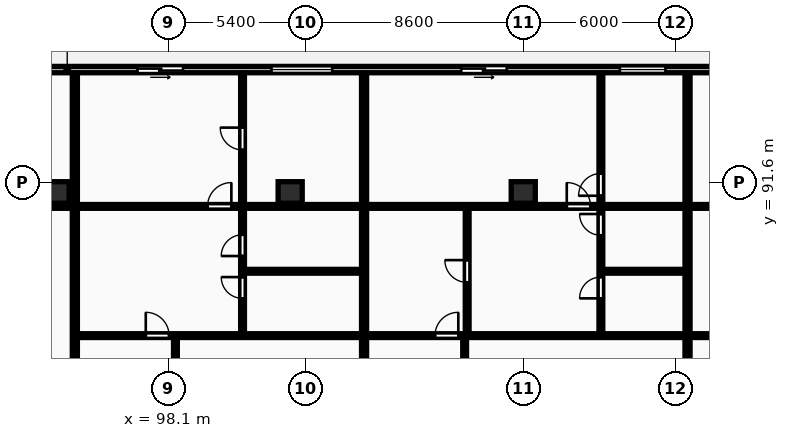
"""IFC4 building model, lengths in metres.
Left out: names, types, materials, properties, quantities, classifications, styles, units other than length and angle.
Written with IfcOpenShell. Run it as: python <this file> out.ifc"""

import sys

from ifc_helpers import new_model, si_unit, direction, frame, frame_2d, origin, origin_2d, place, context, subcontext, project, spatial, rectangle, extrude, element, fill, save


model = new_model("IFC4")
c1 = context("Model", 3, precision=1e-05, world=origin(), true_north=direction((0.0, 1.0)))
c2 = subcontext(c1, "Body", "Model", "MODEL_VIEW")
j1 = project(units=[si_unit("LENGTHUNIT", "METRE"), si_unit("PLANEANGLEUNIT", "RADIAN")], contexts=[c1])
p1 = place(None, origin())
s1 = spatial("IfcSite", under=j1, at=p1, CompositionType="ELEMENT")
p2 = place(p1, origin())
s2 = spatial("IfcBuilding", under=s1, at=p2, CompositionType="ELEMENT")
p3 = place(p2, frame((0.0, 0.0, 113.3)))
s3 = spatial("IfcBuildingStorey", under=s2, at=p3, CompositionType="ELEMENT", Elevation=113.3)
for number, where, z_axis, x_axis in (
    (1, (93.7, 91.2, 0.0), (0.0, 0.0, 1.0), (1.0, 0.0, 0.0)),
    (2, (102.9, 91.2, 0.0), (0.0, 0.0, 1.0), (1.0, 0.0, 0.0)),
    (3, (112.1, 91.2, 0.0), (0.0, 0.0, 1.0), (1.0, 0.0, 0.0)),
):
    element("IfcColumn", number, at=place(p3, frame(where, z_axis=z_axis, x_axis=x_axis)), inside=s3, PredefinedType="COLUMN", context=c2, shape_type="SweptSolid", body=[
        extrude(rectangle(XDim=0.95, YDim=0.85, at=origin_2d()), origin(), (0.0, 0.0, 1.0), 3.25),
    ])
p4 = place(p3, frame((130.6, 96.05, 0.0), z_axis=(0.0, 0.0, 1.0), x_axis=(-1.0, 0.0, 0.0)))
e4 = element("IfcWall", 4, at=p4, inside=s3, PredefinedType="STANDARD", context=c2, shape_type="SweptSolid", body=[
    extrude(rectangle(XDim=73.0, YDim=0.25, at=frame_2d((36.5, 0.0))), origin(), (0.0, 0.0, 1.0), 2.97),
])
p5 = place(p4, frame((68.319, 0.0, 0.0)))
e5 = element("IfcOpeningElement", 5, at=p5, cuts=e4, PredefinedType="OPENING", context=c2, shape_type="SweptSolid", body=[
    extrude(rectangle(XDim=1.8, YDim=2.2, at=frame_2d((0.9, 1.1))), frame((0.0, 0.135, 0.0), z_axis=(0.0, -1.0, 0.0), x_axis=(1.0, 0.0, 0.0)), (0.0, 0.0, 1.0), 0.27),
])
p6 = place(p4, frame((59.277, 0.0, 0.85)))
e6 = element("IfcOpeningElement", 6, at=p6, cuts=e4, PredefinedType="OPENING", context=c2, shape_type="SweptSolid", body=[
    extrude(rectangle(XDim=2.4, YDim=1.9, at=frame_2d((1.2, 0.95))), frame((0.0, 0.135, 0.0), z_axis=(0.0, -1.0, 0.0), x_axis=(1.0, 0.0, 0.0)), (0.0, 0.0, 1.0), 0.27),
])
p7 = place(p4, frame((50.199, 0.0, 0.0)))
e7 = element("IfcOpeningElement", 7, at=p7, cuts=e4, PredefinedType="OPENING", context=c2, shape_type="SweptSolid", body=[
    extrude(rectangle(XDim=1.8, YDim=2.2, at=frame_2d((0.9, 1.1))), frame((0.0, 0.135, 0.0), z_axis=(0.0, -1.0, 0.0), x_axis=(1.0, 0.0, 0.0)), (0.0, 0.0, 1.0), 0.27),
])
p8 = place(p4, frame((40.481, 0.0, 0.85)))
e8 = element("IfcOpeningElement", 8, at=p8, cuts=e4, PredefinedType="OPENING", context=c2, shape_type="SweptSolid", body=[
    extrude(rectangle(XDim=2.4, YDim=1.9, at=frame_2d((1.2, 0.95))), frame((0.0, 0.135, 0.0), z_axis=(0.0, -1.0, 0.0), x_axis=(1.0, 0.0, 0.0)), (0.0, 0.0, 1.0), 0.27),
])
p9 = place(p4, frame((31.93, 0.0, 0.0)))
e9 = element("IfcOpeningElement", 9, at=p9, cuts=e4, PredefinedType="OPENING", context=c2, shape_type="SweptSolid", body=[
    extrude(rectangle(XDim=1.8, YDim=2.2, at=frame_2d((0.9, 1.1))), frame((0.0, 0.135, 0.0), z_axis=(0.0, -1.0, 0.0), x_axis=(1.0, 0.0, 0.0)), (0.0, 0.0, 1.0), 0.27),
])
p10 = place(p4, frame((26.042, 0.0, 0.85)))
e10 = element("IfcOpeningElement", 10, at=p10, cuts=e4, PredefinedType="OPENING", context=c2, shape_type="SweptSolid", body=[
    extrude(rectangle(XDim=2.4, YDim=1.9, at=frame_2d((1.2, 0.95))), frame((0.0, 0.135, 0.0), z_axis=(0.0, -1.0, 0.0), x_axis=(1.0, 0.0, 0.0)), (0.0, 0.0, 1.0), 0.27),
])
p11 = place(p4, frame((19.15, 0.0, 0.0)))
e11 = element("IfcOpeningElement", 11, at=p11, cuts=e4, PredefinedType="OPENING", context=c2, shape_type="SweptSolid", body=[
    extrude(rectangle(XDim=1.8, YDim=2.2, at=frame_2d((0.9, 1.1))), frame((0.0, 0.135, 0.0), z_axis=(0.0, -1.0, 0.0), x_axis=(1.0, 0.0, 0.0)), (0.0, 0.0, 1.0), 0.27),
])
p12 = place(p4, frame((12.886, 0.0, 0.85)))
e12 = element("IfcOpeningElement", 12, at=p12, cuts=e4, PredefinedType="OPENING", context=c2, shape_type="SweptSolid", body=[
    extrude(rectangle(XDim=1.8, YDim=1.8, at=frame_2d((0.9, 0.9))), frame((0.0, 0.135, 0.0), z_axis=(0.0, -1.0, 0.0), x_axis=(1.0, 0.0, 0.0)), (0.0, 0.0, 1.0), 0.27),
])
p13 = place(p4, frame((7.088, 0.0, 0.0)))
e13 = element("IfcOpeningElement", 13, at=p13, cuts=e4, PredefinedType="OPENING", context=c2, shape_type="SweptSolid", body=[
    extrude(rectangle(XDim=1.8, YDim=2.2, at=frame_2d((0.9, 1.1))), frame((0.0, 0.135, 0.0), z_axis=(0.0, -1.0, 0.0), x_axis=(1.0, 0.0, 0.0)), (0.0, 0.0, 1.0), 0.27),
])
p14 = place(p4, frame((0.9, 0.0, 0.85)))
e14 = element("IfcOpeningElement", 14, at=p14, cuts=e4, PredefinedType="OPENING", context=c2, shape_type="SweptSolid", body=[
    extrude(rectangle(XDim=2.4, YDim=1.9, at=frame_2d((1.2, 0.95))), frame((0.0, 0.135, 0.0), z_axis=(0.0, -1.0, 0.0), x_axis=(1.0, 0.0, 0.0)), (0.0, 0.0, 1.0), 0.27),
])
p15 = place(p3, frame((94.401, 69.83, 0.0), z_axis=(0.0, 0.0, 1.0), x_axis=(0.0, 1.0, 0.0)))
e15 = element("IfcWall", 15, at=p15, inside=s3, PredefinedType="PARTITIONING", context=c2, shape_type="SweptSolid", body=[
    extrude(rectangle(XDim=26.07, YDim=0.2, at=frame_2d((13.035, 0.0))), origin(), (0.0, 0.0, 1.0), 2.97),
])
p16 = place(p3, frame((75.405, 90.65, 0.0), z_axis=(0.0, 0.0, 1.0), x_axis=(1.0, 0.0, 0.0)))
e16 = element("IfcWall", 16, at=p16, inside=s3, PredefinedType="PARTITIONING", context=c2, shape_type="SweptSolid", body=[
    extrude(rectangle(XDim=18.916, YDim=0.15, at=frame_2d((9.458, 0.0))), origin(), (0.0, 0.0, 1.0), 2.97),
])
p17 = place(p16, frame((6.426, 0.0, 0.0)))
e17 = element("IfcOpeningElement", 17, at=p17, cuts=e16, PredefinedType="OPENING", context=c2, shape_type="SweptSolid", body=[
    extrude(rectangle(XDim=0.94, YDim=2.1, at=frame_2d((0.47, 1.05))), frame((0.0, 0.085, 0.0), z_axis=(0.0, -1.0, 0.0), x_axis=(1.0, 0.0, 0.0)), (0.0, 0.0, 1.0), 0.17),
])
p18 = place(p16, frame((10.856, 0.0, 0.0)))
e18 = element("IfcOpeningElement", 18, at=p18, cuts=e16, PredefinedType="OPENING", context=c2, shape_type="SweptSolid", body=[
    extrude(rectangle(XDim=0.94, YDim=2.1, at=frame_2d((0.47, 1.05))), frame((0.0, 0.085, 0.0), z_axis=(0.0, -1.0, 0.0), x_axis=(1.0, 0.0, 0.0)), (0.0, 0.0, 1.0), 0.17),
])
p19 = place(p3, frame((105.817, 69.83, 0.0), z_axis=(0.0, 0.0, 1.0), x_axis=(0.0, 1.0, 0.0)))
e19 = element("IfcWall", 19, at=p19, inside=s3, PredefinedType="PARTITIONING", context=c2, shape_type="SweptSolid", body=[
    extrude(rectangle(XDim=26.07, YDim=0.2, at=frame_2d((13.035, 0.0))), origin(), (0.0, 0.0, 1.0), 2.97),
])
p20 = place(p3, frame((98.371, 69.81, 0.0), z_axis=(0.0, 0.0, 1.0), x_axis=(0.0, 1.0, 0.0)))
e20 = element("IfcWall", 20, at=p20, inside=s3, PredefinedType="PARTITIONING", context=c2, shape_type="SweptSolid", body=[
    extrude(rectangle(XDim=15.7, YDim=0.15, at=frame_2d((7.85, 0.0))), origin(), (0.0, 0.0, 1.0), 2.97),
])
p21 = place(p20, frame((6.54, 0.0, 0.0)))
e21 = element("IfcOpeningElement", 21, at=p21, cuts=e20, PredefinedType="OPENING", context=c2, shape_type="SweptSolid", body=[
    extrude(rectangle(XDim=0.88, YDim=2.06, at=frame_2d((0.44, 1.03))), frame((0.0, 0.085, 0.0), z_axis=(0.0, -1.0, 0.0), x_axis=(1.0, 0.0, 0.0)), (0.0, 0.0, 1.0), 0.17),
])
p22 = place(p3, frame((101.08, 88.09, 0.0), z_axis=(0.0, 0.0, 1.0), x_axis=(1.0, 0.0, 0.0)))
e22 = element("IfcWall", 22, at=p22, inside=s3, PredefinedType="PARTITIONING", context=c2, shape_type="SweptSolid", body=[
    extrude(rectangle(XDim=4.656, YDim=0.15, at=frame_2d((2.328, 0.0))), origin(), (0.0, 0.0, 1.0), 2.97),
])
p23 = place(p3, frame((101.02, 85.59, 0.0), z_axis=(0.0, 0.0, 1.0), x_axis=(0.0, 1.0, 0.0)))
e23 = element("IfcWall", 23, at=p23, inside=s3, PredefinedType="PARTITIONING", context=c2, shape_type="SweptSolid", body=[
    extrude(rectangle(XDim=10.31, YDim=0.15, at=frame_2d((5.155, 0.0))), origin(), (0.0, 0.0, 1.0), 2.97),
])
p24 = place(p23, frame((1.43, 0.0, 0.0)))
e24 = element("IfcOpeningElement", 24, at=p24, cuts=e23, PredefinedType="OPENING", context=c2, shape_type="SweptSolid", body=[
    extrude(rectangle(XDim=0.84, YDim=2.04, at=frame_2d((0.42, 1.02))), frame((0.0, 0.085, 0.0), z_axis=(0.0, -1.0, 0.0), x_axis=(1.0, 0.0, 0.0)), (0.0, 0.0, 1.0), 0.17),
])
p25 = place(p23, frame((3.102, 0.0, 0.0)))
e25 = element("IfcOpeningElement", 25, at=p25, cuts=e23, PredefinedType="OPENING", context=c2, shape_type="SweptSolid", body=[
    extrude(rectangle(XDim=0.84, YDim=2.04, at=frame_2d((0.42, 1.02))), frame((0.0, 0.085, 0.0), z_axis=(0.0, -1.0, 0.0), x_axis=(1.0, 0.0, 0.0)), (0.0, 0.0, 1.0), 0.17),
])
p26 = place(p23, frame((7.29, 0.0, 0.0)))
e26 = element("IfcOpeningElement", 26, at=p26, cuts=e23, PredefinedType="OPENING", context=c2, shape_type="SweptSolid", body=[
    extrude(rectangle(XDim=0.88, YDim=2.06, at=frame_2d((0.44, 1.03))), frame((0.0, 0.085, 0.0), z_axis=(0.0, -1.0, 0.0), x_axis=(1.0, 0.0, 0.0)), (0.0, 0.0, 1.0), 0.17),
])
p27 = place(p3, frame((94.481, 85.55, 0.0), z_axis=(0.0, 0.0, 1.0), x_axis=(1.0, 0.0, 0.0)))
e27 = element("IfcWall", 27, at=p27, inside=s3, PredefinedType="PARTITIONING", context=c2, shape_type="SweptSolid", body=[
    extrude(rectangle(XDim=11.256, YDim=0.15, at=frame_2d((5.628, 0.0))), origin(), (0.0, 0.0, 1.0), 2.97),
])
p28 = place(p27, frame((2.72, 0.0, 0.0)))
e28 = element("IfcOpeningElement", 28, at=p28, cuts=e27, PredefinedType="OPENING", context=c2, shape_type="SweptSolid", body=[
    extrude(rectangle(XDim=0.92, YDim=2.08, at=frame_2d((0.46, 1.04))), frame((0.0, 0.085, 0.0), z_axis=(0.0, -1.0, 0.0), x_axis=(1.0, 0.0, 0.0)), (0.0, 0.0, 1.0), 0.17),
])
p29 = place(p3, frame((94.481, 90.65, 0.0), z_axis=(0.0, 0.0, 1.0), x_axis=(1.0, 0.0, 0.0)))
e29 = element("IfcWall", 29, at=p29, inside=s3, PredefinedType="PARTITIONING", context=c2, shape_type="SweptSolid", body=[
    extrude(rectangle(XDim=11.256, YDim=0.15, at=frame_2d((5.628, 0.0))), origin(), (0.0, 0.0, 1.0), 2.97),
])
p30 = place(p29, frame((5.158, 0.0, 0.0)))
e30 = element("IfcOpeningElement", 30, at=p30, cuts=e29, PredefinedType="OPENING", context=c2, shape_type="SweptSolid", body=[
    extrude(rectangle(XDim=0.94, YDim=2.1, at=frame_2d((0.47, 1.05))), frame((0.0, 0.085, 0.0), z_axis=(0.0, -1.0, 0.0), x_axis=(1.0, 0.0, 0.0)), (0.0, 0.0, 1.0), 0.17),
])
p31 = place(p3, frame((118.584, 69.83, 0.0), z_axis=(0.0, 0.0, 1.0), x_axis=(0.0, 1.0, 0.0)))
e31 = element("IfcWall", 31, at=p31, inside=s3, PredefinedType="PARTITIONING", context=c2, shape_type="SweptSolid", body=[
    extrude(rectangle(XDim=26.07, YDim=0.2, at=frame_2d((13.035, 0.0))), origin(), (0.0, 0.0, 1.0), 2.97),
])
p32 = place(p3, frame((109.787, 69.81, 0.0), z_axis=(0.0, 0.0, 1.0), x_axis=(0.0, 1.0, 0.0)))
e32 = element("IfcWall", 32, at=p32, inside=s3, PredefinedType="PARTITIONING", context=c2, shape_type="SweptSolid", body=[
    extrude(rectangle(XDim=15.7, YDim=0.15, at=frame_2d((7.85, 0.0))), origin(), (0.0, 0.0, 1.0), 2.97),
])
p33 = place(p32, frame((6.72, 0.0, 0.0)))
e33 = element("IfcOpeningElement", 33, at=p33, cuts=e32, PredefinedType="OPENING", context=c2, shape_type="SweptSolid", body=[
    extrude(rectangle(XDim=0.88, YDim=2.06, at=frame_2d((0.44, 1.03))), frame((0.0, 0.085, 0.0), z_axis=(0.0, -1.0, 0.0), x_axis=(1.0, 0.0, 0.0)), (0.0, 0.0, 1.0), 0.17),
])
p34 = place(p3, frame((109.887, 85.59, 0.0), z_axis=(0.0, 0.0, 1.0), x_axis=(0.0, 1.0, 0.0)))
e34 = element("IfcWall", 34, at=p34, inside=s3, PredefinedType="PARTITIONING", context=c2, shape_type="SweptSolid", body=[
    extrude(rectangle(XDim=5.0, YDim=0.15, at=frame_2d((2.5, 0.0))), origin(), (0.0, 0.0, 1.0), 2.97),
])
p35 = place(p34, frame((2.06, 0.0, 0.0)))
e35 = element("IfcOpeningElement", 35, at=p35, cuts=e34, PredefinedType="OPENING", context=c2, shape_type="SweptSolid", body=[
    extrude(rectangle(XDim=0.88, YDim=2.06, at=frame_2d((0.44, 1.03))), frame((0.0, 0.085, 0.0), z_axis=(0.0, -1.0, 0.0), x_axis=(1.0, 0.0, 0.0)), (0.0, 0.0, 1.0), 0.17),
])
p36 = place(p3, frame((115.224, 88.09, 0.0), z_axis=(0.0, 0.0, 1.0), x_axis=(1.0, 0.0, 0.0)))
e36 = element("IfcWall", 36, at=p36, inside=s3, PredefinedType="PARTITIONING", context=c2, shape_type="SweptSolid", body=[
    extrude(rectangle(XDim=3.28, YDim=0.15, at=frame_2d((1.64, 0.0))), origin(), (0.0, 0.0, 1.0), 2.97),
])
p37 = place(p3, frame((115.164, 85.59, 0.0), z_axis=(0.0, 0.0, 1.0), x_axis=(0.0, 1.0, 0.0)))
e37 = element("IfcWall", 37, at=p37, inside=s3, PredefinedType="PARTITIONING", context=c2, shape_type="SweptSolid", body=[
    extrude(rectangle(XDim=10.31, YDim=0.15, at=frame_2d((5.155, 0.0))), origin(), (0.0, 0.0, 1.0), 2.97),
])
p38 = place(p37, frame((1.43, 0.0, 0.0)))
e38 = element("IfcOpeningElement", 38, at=p38, cuts=e37, PredefinedType="OPENING", context=c2, shape_type="SweptSolid", body=[
    extrude(rectangle(XDim=0.84, YDim=2.04, at=frame_2d((0.42, 1.02))), frame((0.0, 0.085, 0.0), z_axis=(0.0, -1.0, 0.0), x_axis=(1.0, 0.0, 0.0)), (0.0, 0.0, 1.0), 0.17),
])
p39 = place(p37, frame((3.92, 0.0, 0.0)))
e39 = element("IfcOpeningElement", 39, at=p39, cuts=e37, PredefinedType="OPENING", context=c2, shape_type="SweptSolid", body=[
    extrude(rectangle(XDim=0.84, YDim=2.04, at=frame_2d((0.42, 1.02))), frame((0.0, 0.085, 0.0), z_axis=(0.0, -1.0, 0.0), x_axis=(1.0, 0.0, 0.0)), (0.0, 0.0, 1.0), 0.17),
])
p40 = place(p37, frame((5.48, 0.0, 0.0)))
e40 = element("IfcOpeningElement", 40, at=p40, cuts=e37, PredefinedType="OPENING", context=c2, shape_type="SweptSolid", body=[
    extrude(rectangle(XDim=0.88, YDim=2.06, at=frame_2d((0.44, 1.03))), frame((0.0, 0.085, 0.0), z_axis=(0.0, -1.0, 0.0), x_axis=(1.0, 0.0, 0.0)), (0.0, 0.0, 1.0), 0.17),
])
p41 = place(p3, frame((105.896, 85.55, 0.0), z_axis=(0.0, 0.0, 1.0), x_axis=(1.0, 0.0, 0.0)))
e41 = element("IfcWall", 41, at=p41, inside=s3, PredefinedType="PARTITIONING", context=c2, shape_type="SweptSolid", body=[
    extrude(rectangle(XDim=12.607, YDim=0.15, at=frame_2d((6.304, 0.0))), origin(), (0.0, 0.0, 1.0), 2.97),
])
p42 = place(p41, frame((2.72, 0.0, 0.0)))
e42 = element("IfcOpeningElement", 42, at=p42, cuts=e41, PredefinedType="OPENING", context=c2, shape_type="SweptSolid", body=[
    extrude(rectangle(XDim=0.92, YDim=2.08, at=frame_2d((0.46, 1.04))), frame((0.0, 0.085, 0.0), z_axis=(0.0, -1.0, 0.0), x_axis=(1.0, 0.0, 0.0)), (0.0, 0.0, 1.0), 0.17),
])
p43 = place(p3, frame((105.896, 90.65, 0.0), z_axis=(0.0, 0.0, 1.0), x_axis=(1.0, 0.0, 0.0)))
e43 = element("IfcWall", 43, at=p43, inside=s3, PredefinedType="PARTITIONING", context=c2, shape_type="SweptSolid", body=[
    extrude(rectangle(XDim=12.607, YDim=0.15, at=frame_2d((6.304, 0.0))), origin(), (0.0, 0.0, 1.0), 2.97),
])
p44 = place(p43, frame((7.921, 0.0, 0.0)))
e44 = element("IfcOpeningElement", 44, at=p44, cuts=e43, PredefinedType="OPENING", context=c2, shape_type="SweptSolid", body=[
    extrude(rectangle(XDim=0.94, YDim=2.1, at=frame_2d((0.47, 1.05))), frame((0.0, 0.085, 0.0), z_axis=(0.0, -1.0, 0.0), x_axis=(1.0, 0.0, 0.0)), (0.0, 0.0, 1.0), 0.17),
])
p45 = place(p3, frame((118.664, 85.55, 0.0), z_axis=(0.0, 0.0, 1.0), x_axis=(1.0, 0.0, 0.0)))
e45 = element("IfcWall", 45, at=p45, inside=s3, PredefinedType="PARTITIONING", context=c2, shape_type="SweptSolid", body=[
    extrude(rectangle(XDim=11.856, YDim=0.15, at=frame_2d((5.928, 0.0))), origin(), (0.0, 0.0, 1.0), 2.97),
])
p46 = place(p45, frame((2.72, 0.0, 0.0)))
e46 = element("IfcOpeningElement", 46, at=p46, cuts=e45, PredefinedType="OPENING", context=c2, shape_type="SweptSolid", body=[
    extrude(rectangle(XDim=0.92, YDim=2.08, at=frame_2d((0.46, 1.04))), frame((0.0, 0.085, 0.0), z_axis=(0.0, -1.0, 0.0), x_axis=(1.0, 0.0, 0.0)), (0.0, 0.0, 1.0), 0.17),
])
p47 = place(p3, frame((118.664, 90.65, 0.0), z_axis=(0.0, 0.0, 1.0), x_axis=(1.0, 0.0, 0.0)))
e47 = element("IfcWall", 47, at=p47, inside=s3, PredefinedType="PARTITIONING", context=c2, shape_type="SweptSolid", body=[
    extrude(rectangle(XDim=11.856, YDim=0.15, at=frame_2d((5.928, 0.0))), origin(), (0.0, 0.0, 1.0), 2.97),
])
p48 = place(p47, frame((5.458, 0.0, 0.0)))
e48 = element("IfcOpeningElement", 48, at=p48, cuts=e47, PredefinedType="OPENING", context=c2, shape_type="SweptSolid", body=[
    extrude(rectangle(XDim=0.94, YDim=2.1, at=frame_2d((0.47, 1.05))), frame((0.0, 0.085, 0.0), z_axis=(0.0, -1.0, 0.0), x_axis=(1.0, 0.0, 0.0)), (0.0, 0.0, 1.0), 0.17),
])
p49 = place(p9, origin())
e49 = element("IfcDoor", 49, at=p49, inside=s3, OperationType="SLIDING_TO_LEFT", PredefinedType="DOOR", context=c2, shape_type="SweptSolid", body=[
    extrude(rectangle(XDim=1.8, YDim=2.2, at=frame_2d((0.9, 1.1))), frame((0.0, 0.025, 0.0), z_axis=(0.0, -1.0, 0.0), x_axis=(1.0, 0.0, 0.0)), (0.0, 0.0, 1.0), 0.05),
])
fill(e9, e49)
p50 = place(p10, origin())
e50 = element("IfcWindow", 50, at=p50, inside=s3, PartitioningType="DOUBLE_PANEL_VERTICAL", PredefinedType="WINDOW", context=c2, shape_type="SweptSolid", body=[
    extrude(rectangle(XDim=2.4, YDim=1.9, at=frame_2d((1.2, 0.95))), frame((0.0, 0.03, 0.0), z_axis=(0.0, -1.0, 0.0), x_axis=(1.0, 0.0, 0.0)), (0.0, 0.0, 1.0), 0.06),
])
fill(e10, e50)
p51 = place(p11, origin())
e51 = element("IfcDoor", 51, at=p51, inside=s3, OperationType="SLIDING_TO_LEFT", PredefinedType="DOOR", context=c2, shape_type="SweptSolid", body=[
    extrude(rectangle(XDim=1.8, YDim=2.2, at=frame_2d((0.9, 1.1))), frame((0.0, 0.025, 0.0), z_axis=(0.0, -1.0, 0.0), x_axis=(1.0, 0.0, 0.0)), (0.0, 0.0, 1.0), 0.05),
])
fill(e11, e51)
p52 = place(p12, origin())
e52 = element("IfcWindow", 52, at=p52, inside=s3, PartitioningType="SINGLE_PANEL", PredefinedType="WINDOW", context=c2, shape_type="SweptSolid", body=[
    extrude(rectangle(XDim=1.8, YDim=1.8, at=frame_2d((0.9, 0.9))), frame((0.0, 0.03, 0.0), z_axis=(0.0, -1.0, 0.0), x_axis=(1.0, 0.0, 0.0)), (0.0, 0.0, 1.0), 0.06),
])
fill(e12, e52)
p53 = place(p24, origin())
e53 = element("IfcDoor", 53, at=p53, inside=s3, OperationType="SINGLE_SWING_RIGHT", PredefinedType="DOOR", context=c2, shape_type="SweptSolid", body=[
    extrude(rectangle(XDim=0.84, YDim=2.04, at=frame_2d((0.42, 1.02))), frame((0.0, 0.025, 0.0), z_axis=(0.0, -1.0, 0.0), x_axis=(1.0, 0.0, 0.0)), (0.0, 0.0, 1.0), 0.05),
])
fill(e24, e53)
p54 = place(p25, origin())
e54 = element("IfcDoor", 54, at=p54, inside=s3, OperationType="SINGLE_SWING_LEFT", PredefinedType="DOOR", context=c2, shape_type="SweptSolid", body=[
    extrude(rectangle(XDim=0.84, YDim=2.04, at=frame_2d((0.42, 1.02))), frame((0.0, 0.025, 0.0), z_axis=(0.0, -1.0, 0.0), x_axis=(1.0, 0.0, 0.0)), (0.0, 0.0, 1.0), 0.05),
])
fill(e25, e54)
p55 = place(p26, origin())
e55 = element("IfcDoor", 55, at=p55, inside=s3, OperationType="SINGLE_SWING_RIGHT", PredefinedType="DOOR", context=c2, shape_type="SweptSolid", body=[
    extrude(rectangle(XDim=0.88, YDim=2.06, at=frame_2d((0.44, 1.03))), frame((0.0, 0.025, 0.0), z_axis=(0.0, -1.0, 0.0), x_axis=(1.0, 0.0, 0.0)), (0.0, 0.0, 1.0), 0.05),
])
fill(e26, e55)
p56 = place(p28, origin())
e56 = element("IfcDoor", 56, at=p56, inside=s3, OperationType="SINGLE_SWING_LEFT", PredefinedType="DOOR", context=c2, shape_type="SweptSolid", body=[
    extrude(rectangle(XDim=0.92, YDim=2.08, at=frame_2d((0.46, 1.04))), frame((0.0, 0.025, 0.0), z_axis=(0.0, -1.0, 0.0), x_axis=(1.0, 0.0, 0.0)), (0.0, 0.0, 1.0), 0.05),
])
fill(e28, e56)
p57 = place(p30, origin())
e57 = element("IfcDoor", 57, at=p57, inside=s3, OperationType="SINGLE_SWING_RIGHT", PredefinedType="DOOR", context=c2, shape_type="SweptSolid", body=[
    extrude(rectangle(XDim=0.94, YDim=2.1, at=frame_2d((0.47, 1.05))), frame((0.0, 0.025, 0.0), z_axis=(0.0, -1.0, 0.0), x_axis=(1.0, 0.0, 0.0)), (0.0, 0.0, 1.0), 0.05),
])
fill(e30, e57)
p58 = place(p35, origin())
e58 = element("IfcDoor", 58, at=p58, inside=s3, OperationType="SINGLE_SWING_RIGHT", PredefinedType="DOOR", context=c2, shape_type="SweptSolid", body=[
    extrude(rectangle(XDim=0.88, YDim=2.06, at=frame_2d((0.44, 1.03))), frame((0.0, 0.025, 0.0), z_axis=(0.0, -1.0, 0.0), x_axis=(1.0, 0.0, 0.0)), (0.0, 0.0, 1.0), 0.05),
])
fill(e35, e58)
p59 = place(p38, origin())
e59 = element("IfcDoor", 59, at=p59, inside=s3, OperationType="SINGLE_SWING_LEFT", PredefinedType="DOOR", context=c2, shape_type="SweptSolid", body=[
    extrude(rectangle(XDim=0.84, YDim=2.04, at=frame_2d((0.42, 1.02))), frame((0.0, 0.025, 0.0), z_axis=(0.0, -1.0, 0.0), x_axis=(1.0, 0.0, 0.0)), (0.0, 0.0, 1.0), 0.05),
])
fill(e38, e59)
p60 = place(p39, origin())
e60 = element("IfcDoor", 60, at=p60, inside=s3, OperationType="SINGLE_SWING_RIGHT", PredefinedType="DOOR", context=c2, shape_type="SweptSolid", body=[
    extrude(rectangle(XDim=0.84, YDim=2.04, at=frame_2d((0.42, 1.02))), frame((0.0, 0.025, 0.0), z_axis=(0.0, -1.0, 0.0), x_axis=(1.0, 0.0, 0.0)), (0.0, 0.0, 1.0), 0.05),
])
fill(e39, e60)
p61 = place(p40, origin())
e61 = element("IfcDoor", 61, at=p61, inside=s3, OperationType="SINGLE_SWING_LEFT", PredefinedType="DOOR", context=c2, shape_type="SweptSolid", body=[
    extrude(rectangle(XDim=0.88, YDim=2.06, at=frame_2d((0.44, 1.03))), frame((0.0, 0.025, 0.0), z_axis=(0.0, -1.0, 0.0), x_axis=(1.0, 0.0, 0.0)), (0.0, 0.0, 1.0), 0.05),
])
fill(e40, e61)
p62 = place(p42, origin())
e62 = element("IfcDoor", 62, at=p62, inside=s3, OperationType="SINGLE_SWING_RIGHT", PredefinedType="DOOR", context=c2, shape_type="SweptSolid", body=[
    extrude(rectangle(XDim=0.92, YDim=2.08, at=frame_2d((0.46, 1.04))), frame((0.0, 0.025, 0.0), z_axis=(0.0, -1.0, 0.0), x_axis=(1.0, 0.0, 0.0)), (0.0, 0.0, 1.0), 0.05),
])
fill(e42, e62)
p63 = place(p44, origin())
e63 = element("IfcDoor", 63, at=p63, inside=s3, OperationType="SINGLE_SWING_LEFT", PredefinedType="DOOR", context=c2, shape_type="SweptSolid", body=[
    extrude(rectangle(XDim=0.94, YDim=2.1, at=frame_2d((0.47, 1.05))), frame((0.0, 0.025, 0.0), z_axis=(0.0, -1.0, 0.0), x_axis=(1.0, 0.0, 0.0)), (0.0, 0.0, 1.0), 0.05),
])
fill(e44, e63)
save(model, sys.argv[1])
